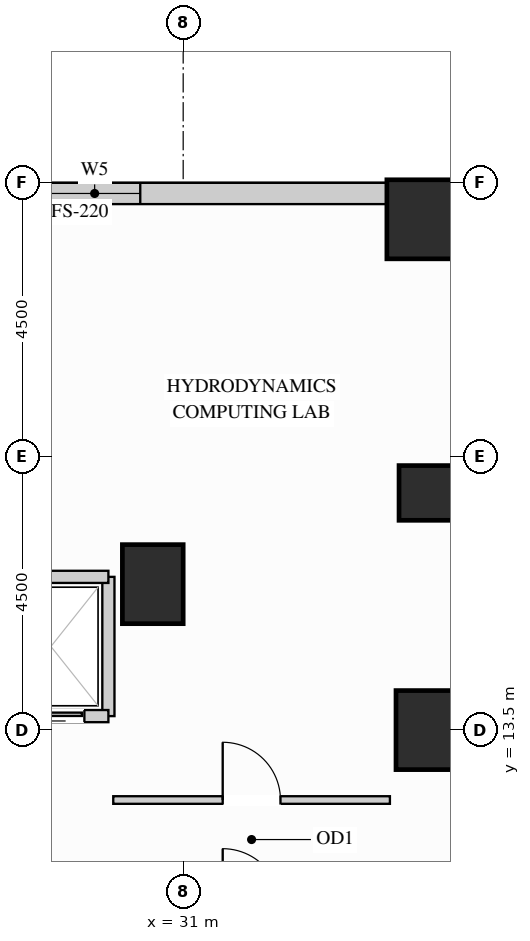
"""IFC4 building model, lengths in metres.
Left out: names, types, materials, properties, quantities, classifications, styles, units other than length and angle.
Written with IfcOpenShell. Run it as: python <this file> out.ifc"""

import sys

from ifc_helpers import new_model, si_unit, direction, frame, frame_2d, origin, origin_2d, place, context, subcontext, project, spatial, rectangle, extrude, source, transform, mapped, element, fill, save


model = new_model("IFC4")
c1 = context("Model", 3, precision=1e-05, world=origin(), true_north=direction((0.0, 1.0)))
c2 = subcontext(c1, "Body", "Model", "MODEL_VIEW")
j1 = project(units=[si_unit("LENGTHUNIT", "METRE"), si_unit("PLANEANGLEUNIT", "RADIAN")], contexts=[c1])
p1 = place(None, origin())
s1 = spatial("IfcSite", under=j1, at=p1, CompositionType="ELEMENT")
p2 = place(p1, origin())
s2 = spatial("IfcBuilding", under=s1, at=p2, CompositionType="ELEMENT")
p3 = place(p2, frame((0.0, 0.0, 36.9)))
s3 = spatial("IfcBuildingStorey", under=s2, at=p3, CompositionType="ELEMENT", Elevation=36.9)
m1 = source(origin(), c2, "Body", "SweptSolid", [
    extrude(rectangle(XDim=0.9, YDim=0.9, at=origin_2d()), origin(), (0.0, 0.0, 1.0), 3.38),
])
p4 = place(p3, frame((35.0, 17.4, 0.0), z_axis=(0.0, 0.0, 1.0), x_axis=(1.0, 0.0, 0.0)))
e1 = element("IfcColumn", 1, at=p4, inside=s3, PredefinedType="COLUMN", context=c2, shape_type="MappedRepresentation", body=[
    mapped(m1, transform((0.0, 0.0, 0.0), x_axis=(1.0, 0.0, 0.0), y_axis=(0.0, 1.0, 0.0), z_axis=(0.0, 0.0, 1.0))),
])
m2 = source(origin(), c2, "Body", "SweptSolid", [
    extrude(rectangle(XDim=1.0, YDim=1.3, at=origin_2d()), origin(), (0.0, 0.0, 1.0), 3.38),
])
for number, where, z_axis, x_axis in (
    (2, (35.0, 13.5, 0.0), (0.0, 0.0, 1.0), (1.0, 0.0, 0.0)),
    (3, (30.5, 15.9, 0.0), (0.0, 0.0, 1.0), (1.0, 0.0, 0.0)),
):
    element("IfcColumn", number, at=place(p3, frame(where, z_axis=z_axis, x_axis=x_axis)), inside=s3, PredefinedType="COLUMN", context=c2, shape_type="MappedRepresentation", body=[
        mapped(m2, transform((0.0, 0.0, 0.0), x_axis=(1.0, 0.0, 0.0), y_axis=(0.0, 1.0, 0.0), z_axis=(0.0, 0.0, 1.0))),
    ])
m3 = source(origin(), c2, "Body", "SweptSolid", [
    extrude(rectangle(XDim=1.3, YDim=1.3, at=origin_2d()), origin(), (0.0, 0.0, 1.0), 3.38),
])
p5 = place(p3, frame((35.0, 21.9, 0.0), z_axis=(0.0, 0.0, 1.0), x_axis=(1.0, 0.0, 0.0)))
e4 = element("IfcColumn", 4, at=p5, inside=s3, PredefinedType="COLUMN", context=c2, shape_type="MappedRepresentation", body=[
    mapped(m3, transform((0.0, 0.0, 0.0), x_axis=(1.0, 0.0, 0.0), y_axis=(0.0, 1.0, 0.0), z_axis=(0.0, 0.0, 1.0))),
])
p6 = place(p3, frame((34.352, 22.325, 0.0), z_axis=(0.0, 0.0, 1.0), x_axis=(-1.0, 0.0, 0.0)))
e5 = element("IfcWall", 5, at=p6, inside=s3, PredefinedType="SOLIDWALL", context=c2, shape_type="SweptSolid", body=[
    extrude(rectangle(XDim=14.854, YDim=0.35, at=frame_2d((7.427, 0.0))), origin(), (0.0, 0.0, 1.0), 3.365),
])
p7 = place(p6, frame((4.058, 0.0, 0.78)))
e6 = element("IfcOpeningElement", 6, at=p7, cuts=e5, PredefinedType="OPENING", context=c2, shape_type="SweptSolid", body=[
    extrude(rectangle(XDim=1.5, YDim=2.0, at=frame_2d((0.75, 1.0))), frame((0.0, 0.185, 0.0), z_axis=(0.0, -1.0, 0.0), x_axis=(1.0, 0.0, 0.0)), (0.0, 0.0, 1.0), 0.37),
])
p8 = place(p6, frame((9.296, 0.0, 0.78)))
e7 = element("IfcOpeningElement", 7, at=p8, cuts=e5, PredefinedType="OPENING", context=c2, shape_type="SweptSolid", body=[
    extrude(rectangle(XDim=1.5, YDim=2.0, at=frame_2d((0.75, 1.0))), frame((0.0, 0.185, 0.0), z_axis=(0.0, -1.0, 0.0), x_axis=(1.0, 0.0, 0.0)), (0.0, 0.0, 1.0), 0.37),
])
p9 = place(p3, frame((29.85, 12.35, 0.0), z_axis=(0.0, 0.0, 1.0), x_axis=(1.0, 0.0, 0.0)))
e8 = element("IfcWall", 8, at=p9, inside=s3, PredefinedType="PARTITIONING", context=c2, shape_type="SweptSolid", body=[
    extrude(rectangle(XDim=4.55, YDim=0.125, at=frame_2d((2.275, 0.0))), origin(), (0.0, 0.0, 1.0), 3.365),
])
p10 = place(p9, frame((1.8, 0.0, 0.0)))
e9 = element("IfcOpeningElement", 9, at=p10, cuts=e8, PredefinedType="OPENING", context=c2, shape_type="SweptSolid", body=[
    extrude(rectangle(XDim=0.95, YDim=2.15, at=frame_2d((0.475, 1.075))), frame((0.0, 0.073, 0.0), z_axis=(0.0, -1.0, 0.0), x_axis=(1.0, 0.0, 0.0)), (0.0, 0.0, 1.0), 0.145),
])
m4 = source(origin(), c2, "Body", "SweptSolid", [
    extrude(rectangle(XDim=2.29, YDim=0.2, at=frame_2d((1.145, 0.0))), origin(), (0.0, 0.0, 1.0), 3.365),
])
p11 = place(p3, frame((29.77, 13.73, 0.0), z_axis=(0.0, 0.0, 1.0), x_axis=(0.0, 1.0, 0.0)))
e10 = element("IfcWall", 10, at=p11, inside=s3, PredefinedType="PARTITIONING", context=c2, shape_type="MappedRepresentation", body=[
    mapped(m4, transform((0.0, 0.0, 0.0), x_axis=(1.0, 0.0, 0.0), y_axis=(0.0, 1.0, 0.0), z_axis=(0.0, 0.0, 1.0))),
])
m5 = source(origin(), c2, "Body", "SweptSolid", [
    extrude(rectangle(XDim=1.89, YDim=0.2, at=frame_2d((0.945, 0.0))), origin(), (0.0, 0.0, 1.0), 2.67),
])
p12 = place(p3, frame((27.88, 16.02, 0.0), z_axis=(0.0, 0.0, 1.0), x_axis=(1.0, 0.0, 0.0)))
e11 = element("IfcWall", 11, at=p12, inside=s3, PredefinedType="PARTITIONING", context=c2, shape_type="MappedRepresentation", body=[
    mapped(m5, transform((0.0, 0.0, 0.0), x_axis=(1.0, 0.0, 0.0), y_axis=(0.0, 1.0, 0.0), z_axis=(0.0, 0.0, 1.0))),
])
p13 = place(p3, frame((27.88, 13.73, 0.0), z_axis=(0.0, 0.0, 1.0), x_axis=(1.0, 0.0, 0.0)))
e12 = element("IfcWall", 12, at=p13, inside=s3, PredefinedType="PARTITIONING", context=c2, shape_type="SweptSolid", body=[
    extrude(rectangle(XDim=1.89, YDim=0.2, at=frame_2d((0.945, 0.0))), origin(), (0.0, 0.0, 1.0), 2.446),
])
p14 = place(p13, frame((0.395, 0.0, 0.0)))
e13 = element("IfcOpeningElement", 13, at=p14, cuts=e12, PredefinedType="OPENING", context=c2, shape_type="SweptSolid", body=[
    extrude(rectangle(XDim=1.1, YDim=2.2, at=frame_2d((0.55, 1.1))), frame((0.0, 0.11, 0.0), z_axis=(0.0, -1.0, 0.0), x_axis=(1.0, 0.0, 0.0)), (0.0, 0.0, 1.0), 0.22),
])
m6 = source(origin(), c2, "Body", "SweptSolid", [
    extrude(rectangle(XDim=1.1, YDim=2.2, at=frame_2d((0.55, 1.1))), frame((0.0, 0.025, 0.0), z_axis=(0.0, -1.0, 0.0), x_axis=(1.0, 0.0, 0.0)), (0.0, 0.0, 1.0), 0.05),
])
p15 = place(p14, origin())
e14 = element("IfcDoor", 14, at=p15, inside=s3, OperationType="SLIDING_TO_LEFT", PredefinedType="DOOR", context=c2, shape_type="MappedRepresentation", body=[
    mapped(m6, transform((0.0, 0.0, 0.0), x_axis=(1.0, 0.0, 0.0), y_axis=(0.0, 1.0, 0.0), z_axis=(0.0, 0.0, 1.0))),
])
fill(e13, e14)
m7 = source(origin(), c2, "Body", "SweptSolid", [
    extrude(rectangle(XDim=0.95, YDim=2.15, at=frame_2d((0.475, 1.075))), frame((0.0, 0.025, 0.0), z_axis=(0.0, -1.0, 0.0), x_axis=(1.0, 0.0, 0.0)), (0.0, 0.0, 1.0), 0.05),
])
p16 = place(p10, origin())
e15 = element("IfcDoor", 15, at=p16, inside=s3, OperationType="SINGLE_SWING_LEFT", PredefinedType="DOOR", context=c2, shape_type="MappedRepresentation", body=[
    mapped(m7, transform((0.0, 0.0, 0.0), x_axis=(1.0, 0.0, 0.0), y_axis=(0.0, 1.0, 0.0), z_axis=(0.0, 0.0, 1.0))),
])
fill(e9, e15)
m8 = source(origin(), c2, "Body", "SweptSolid", [
    extrude(rectangle(XDim=1.5, YDim=2.0, at=frame_2d((0.75, 1.0))), frame((0.0, 0.03, 0.0), z_axis=(0.0, -1.0, 0.0), x_axis=(1.0, 0.0, 0.0)), (0.0, 0.0, 1.0), 0.06),
])
p17 = place(p7, origin())
e16 = element("IfcWindow", 16, at=p17, inside=s3, PartitioningType="SINGLE_PANEL", PredefinedType="WINDOW", context=c2, shape_type="MappedRepresentation", body=[
    mapped(m8, transform((0.0, 0.0, 0.0), x_axis=(1.0, 0.0, 0.0), y_axis=(0.0, 1.0, 0.0), z_axis=(0.0, 0.0, 1.0))),
])
fill(e6, e16)
save(model, sys.argv[1])
